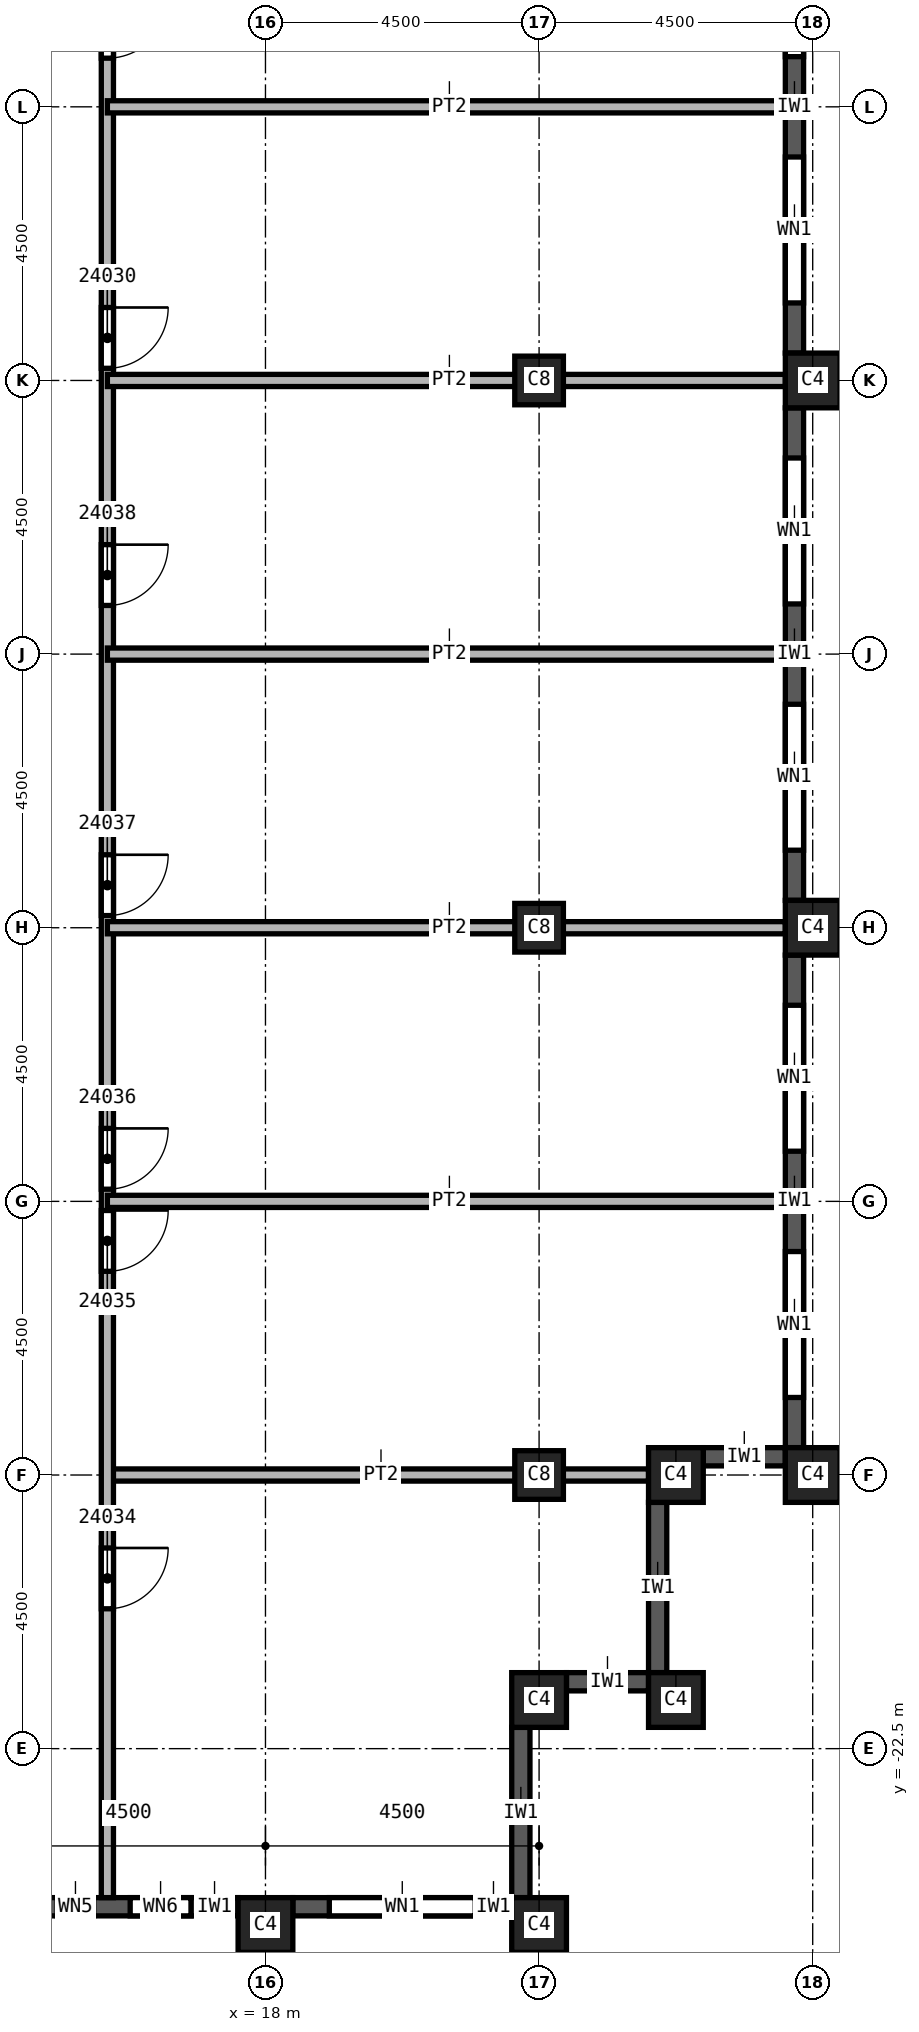
"""IFC4 building model, lengths in metres.
Left out: names, types, materials, properties, quantities, classifications, styles, units other than length and angle.
Written with IfcOpenShell. Run it as: python <this file> out.ifc"""

import sys

from ifc_helpers import new_model, si_unit, direction, frame, frame_2d, origin, origin_2d, place, context, subcontext, project, spatial, rectangle, extrude, element, fill, save


model = new_model("IFC4")
c1 = context("Model", 3, precision=1e-05, world=origin(), true_north=direction((0.0, 1.0)))
c2 = subcontext(c1, "Body", "Model", "MODEL_VIEW")
j1 = project(units=[si_unit("LENGTHUNIT", "METRE"), si_unit("PLANEANGLEUNIT", "RADIAN")], contexts=[c1])
p1 = place(None, origin())
s1 = spatial("IfcSite", under=j1, at=p1, CompositionType="ELEMENT")
p2 = place(p1, origin())
s2 = spatial("IfcBuilding", under=s1, at=p2, CompositionType="ELEMENT")
p3 = place(p2, frame((0.0, 0.0, 342.0)))
s3 = spatial("IfcBuildingStorey", under=s2, at=p3, CompositionType="ELEMENT", Elevation=342.0)
for number, where, z_axis, x_axis in (
    (1, (22.5, 0.0, 0.0), (0.0, 0.0, 1.0), (1.0, 0.0, 0.0)),
    (2, (22.5, -9.0, 0.0), (0.0, 0.0, 1.0), (1.0, 0.0, 0.0)),
    (3, (22.5, -18.0, 0.0), (0.0, 0.0, 1.0), (1.0, 0.0, 0.0)),
):
    element("IfcColumn", number, at=place(p3, frame(where, z_axis=z_axis, x_axis=x_axis)), inside=s3, PredefinedType="COLUMN", context=c2, shape_type="SweptSolid", body=[
        extrude(rectangle(XDim=0.8, YDim=0.8, at=origin_2d()), origin(), (0.0, 0.0, 1.0), 3.74),
    ])
for number, where, z_axis, x_axis in (
    (4, (27.0, 0.0, 0.0), (0.0, 0.0, 1.0), (0.0, 1.0, 0.0)),
    (5, (27.0, -9.0, 0.0), (0.0, 0.0, 1.0), (0.0, 1.0, 0.0)),
    (6, (27.0, -18.0, 0.0), (0.0, 0.0, 1.0), (0.0, 1.0, 0.0)),
    (7, (18.0, -25.4, 0.0), (0.0, 0.0, 1.0), (1.0, 0.0, 0.0)),
    (8, (22.5, -25.4, 0.0), (0.0, 0.0, 1.0), (1.0, 0.0, 0.0)),
    (9, (22.5, -21.7, 0.0), (0.0, 0.0, 1.0), (1.0, 0.0, 0.0)),
    (10, (24.75, -21.7, 0.0), (0.0, 0.0, 1.0), (1.0, 0.0, 0.0)),
    (11, (24.75, -18.0, 0.0), (0.0, 0.0, 1.0), (1.0, 0.0, 0.0)),
):
    element("IfcColumn", number, at=place(p3, frame(where, z_axis=z_axis, x_axis=x_axis)), inside=s3, PredefinedType="COLUMN", context=c2, shape_type="SweptSolid", body=[
        extrude(rectangle(XDim=0.9, YDim=0.9, at=origin_2d()), origin(), (0.0, 0.0, 1.0), 3.74),
    ])
p4 = place(p3, frame((13.95, -25.1, 0.0), z_axis=(0.0, 0.0, 1.0), x_axis=(1.0, 0.0, 0.0)))
e12 = element("IfcWall", 12, at=p4, inside=s3, PredefinedType="SOLIDWALL", context=c2, shape_type="SweptSolid", body=[
    extrude(rectangle(XDim=3.6, YDim=0.3, at=frame_2d((1.8, 0.0))), origin(), (0.0, 0.0, 1.0), 3.14),
])
p5 = place(p4, frame((0.625, 0.0, 0.8)))
e13 = element("IfcOpeningElement", 13, at=p5, cuts=e12, PredefinedType="OPENING", context=c2, shape_type="SweptSolid", body=[
    extrude(rectangle(XDim=0.6, YDim=1.95, at=frame_2d((0.3, 0.975))), frame((0.0, 0.15, 0.0), z_axis=(0.0, -1.0, 0.0), x_axis=(1.0, 0.0, 0.0)), (0.0, 0.0, 1.0), 0.3),
])
p6 = place(p4, frame((1.825, 0.0, 0.8)))
e14 = element("IfcOpeningElement", 14, at=p6, cuts=e12, PredefinedType="OPENING", context=c2, shape_type="SweptSolid", body=[
    extrude(rectangle(XDim=1.0, YDim=1.95, at=frame_2d((0.5, 0.975))), frame((0.0, 0.15, 0.0), z_axis=(0.0, -1.0, 0.0), x_axis=(1.0, 0.0, 0.0)), (0.0, 0.0, 1.0), 0.3),
])
p7 = place(p3, frame((18.45, -25.1, 0.0), z_axis=(0.0, 0.0, 1.0), x_axis=(1.0, 0.0, 0.0)))
e15 = element("IfcWall", 15, at=p7, inside=s3, PredefinedType="SOLIDWALL", context=c2, shape_type="SweptSolid", body=[
    extrude(rectangle(XDim=3.6, YDim=0.3, at=frame_2d((1.8, 0.0))), origin(), (0.0, 0.0, 1.0), 3.14),
])
p8 = place(p7, frame((0.6, 0.0, 0.8)))
e16 = element("IfcOpeningElement", 16, at=p8, cuts=e15, PredefinedType="OPENING", context=c2, shape_type="SweptSolid", body=[
    extrude(rectangle(XDim=2.4, YDim=1.95, at=frame_2d((1.2, 0.975))), frame((0.0, 0.15, 0.0), z_axis=(0.0, -1.0, 0.0), x_axis=(1.0, 0.0, 0.0)), (0.0, 0.0, 1.0), 0.3),
])
p9 = place(p3, frame((22.2, -24.95, 0.0), z_axis=(0.0, 0.0, 1.0), x_axis=(0.0, 1.0, 0.0)))
e17 = element("IfcWall", 17, at=p9, inside=s3, PredefinedType="SOLIDWALL", context=c2, shape_type="SweptSolid", body=[
    extrude(rectangle(XDim=2.8, YDim=0.3, at=frame_2d((1.4, 0.0))), origin(), (0.0, 0.0, 1.0), 3.14),
])
p10 = place(p3, frame((22.95, -21.4, 0.0), z_axis=(0.0, 0.0, 1.0), x_axis=(1.0, 0.0, 0.0)))
e18 = element("IfcWall", 18, at=p10, inside=s3, PredefinedType="SOLIDWALL", context=c2, shape_type="SweptSolid", body=[
    extrude(rectangle(XDim=1.35, YDim=0.3, at=frame_2d((0.675, 0.0))), origin(), (0.0, 0.0, 1.0), 3.14),
])
p11 = place(p3, frame((24.45, -21.25, 0.0), z_axis=(0.0, 0.0, 1.0), x_axis=(0.0, 1.0, 0.0)))
e19 = element("IfcWall", 19, at=p11, inside=s3, PredefinedType="SOLIDWALL", context=c2, shape_type="SweptSolid", body=[
    extrude(rectangle(XDim=2.8, YDim=0.3, at=frame_2d((1.4, 0.0))), origin(), (0.0, 0.0, 1.0), 3.14),
])
p12 = place(p3, frame((25.2, -17.7, 0.0), z_axis=(0.0, 0.0, 1.0), x_axis=(1.0, 0.0, 0.0)))
e20 = element("IfcWall", 20, at=p12, inside=s3, PredefinedType="SOLIDWALL", context=c2, shape_type="SweptSolid", body=[
    extrude(rectangle(XDim=1.35, YDim=0.3, at=frame_2d((0.675, 0.0))), origin(), (0.0, 0.0, 1.0), 3.14),
])
p13 = place(p3, frame((26.7, -17.55, 0.0), z_axis=(0.0, 0.0, 1.0), x_axis=(0.0, 1.0, 0.0)))
e21 = element("IfcWall", 21, at=p13, inside=s3, PredefinedType="SOLIDWALL", context=c2, shape_type="SweptSolid", body=[
    extrude(rectangle(XDim=8.1, YDim=0.3, at=frame_2d((4.05, 0.0))), origin(), (0.0, 0.0, 1.0), 3.14),
])
p14 = place(p13, frame((0.825, 0.0, 0.8)))
e22 = element("IfcOpeningElement", 22, at=p14, cuts=e21, PredefinedType="OPENING", context=c2, shape_type="SweptSolid", body=[
    extrude(rectangle(XDim=2.4, YDim=1.95, at=frame_2d((1.2, 0.975))), frame((0.0, 0.15, 0.0), z_axis=(0.0, -1.0, 0.0), x_axis=(1.0, 0.0, 0.0)), (0.0, 0.0, 1.0), 0.3),
])
p15 = place(p13, frame((4.875, 0.0, 0.8)))
e23 = element("IfcOpeningElement", 23, at=p15, cuts=e21, PredefinedType="OPENING", context=c2, shape_type="SweptSolid", body=[
    extrude(rectangle(XDim=2.4, YDim=1.95, at=frame_2d((1.2, 0.975))), frame((0.0, 0.15, 0.0), z_axis=(0.0, -1.0, 0.0), x_axis=(1.0, 0.0, 0.0)), (0.0, 0.0, 1.0), 0.3),
])
p16 = place(p3, frame((26.7, -8.55, 0.0), z_axis=(0.0, 0.0, 1.0), x_axis=(0.0, 1.0, 0.0)))
e24 = element("IfcWall", 24, at=p16, inside=s3, PredefinedType="SOLIDWALL", context=c2, shape_type="SweptSolid", body=[
    extrude(rectangle(XDim=8.1, YDim=0.3, at=frame_2d((4.05, 0.0))), origin(), (0.0, 0.0, 1.0), 3.14),
])
p17 = place(p16, frame((0.825, 0.0, 0.8)))
e25 = element("IfcOpeningElement", 25, at=p17, cuts=e24, PredefinedType="OPENING", context=c2, shape_type="SweptSolid", body=[
    extrude(rectangle(XDim=2.4, YDim=1.95, at=frame_2d((1.2, 0.975))), frame((0.0, 0.15, 0.0), z_axis=(0.0, -1.0, 0.0), x_axis=(1.0, 0.0, 0.0)), (0.0, 0.0, 1.0), 0.3),
])
p18 = place(p16, frame((4.875, 0.0, 0.8)))
e26 = element("IfcOpeningElement", 26, at=p18, cuts=e24, PredefinedType="OPENING", context=c2, shape_type="SweptSolid", body=[
    extrude(rectangle(XDim=2.4, YDim=1.95, at=frame_2d((1.2, 0.975))), frame((0.0, 0.15, 0.0), z_axis=(0.0, -1.0, 0.0), x_axis=(1.0, 0.0, 0.0)), (0.0, 0.0, 1.0), 0.3),
])
p19 = place(p3, frame((26.7, 0.45, 0.0), z_axis=(0.0, 0.0, 1.0), x_axis=(0.0, 1.0, 0.0)))
e27 = element("IfcWall", 27, at=p19, inside=s3, PredefinedType="SOLIDWALL", context=c2, shape_type="SweptSolid", body=[
    extrude(rectangle(XDim=8.1, YDim=0.3, at=frame_2d((4.05, 0.0))), origin(), (0.0, 0.0, 1.0), 3.14),
])
p20 = place(p19, frame((0.825, 0.0, 0.8)))
e28 = element("IfcOpeningElement", 28, at=p20, cuts=e27, PredefinedType="OPENING", context=c2, shape_type="SweptSolid", body=[
    extrude(rectangle(XDim=2.4, YDim=1.95, at=frame_2d((1.2, 0.975))), frame((0.0, 0.15, 0.0), z_axis=(0.0, -1.0, 0.0), x_axis=(1.0, 0.0, 0.0)), (0.0, 0.0, 1.0), 0.3),
])
p21 = place(p19, frame((4.875, 0.0, 0.8)))
e29 = element("IfcOpeningElement", 29, at=p21, cuts=e27, PredefinedType="OPENING", context=c2, shape_type="SweptSolid", body=[
    extrude(rectangle(XDim=2.4, YDim=1.95, at=frame_2d((1.2, 0.975))), frame((0.0, 0.15, 0.0), z_axis=(0.0, -1.0, 0.0), x_axis=(1.0, 0.0, 0.0)), (0.0, 0.0, 1.0), 0.3),
])
p22 = place(p3, frame((15.4, -18.0, 0.0), z_axis=(0.0, 0.0, 1.0), x_axis=(1.0, 0.0, 0.0)))
e30 = element("IfcWall", 30, at=p22, inside=s3, PredefinedType="PARTITIONING", context=c2, shape_type="SweptSolid", body=[
    extrude(rectangle(XDim=8.9, YDim=0.2, at=frame_2d((4.45, 0.0))), origin(), (0.0, 0.0, 1.0), 3.74),
])
p23 = place(p3, frame((15.4, 24.95, 0.0), z_axis=(0.0, 0.0, 1.0), x_axis=(0.0, -1.0, 0.0)))
e31 = element("IfcWall", 31, at=p23, inside=s3, PredefinedType="PARTITIONING", context=c2, shape_type="SweptSolid", body=[
    extrude(rectangle(XDim=49.9, YDim=0.2, at=frame_2d((24.95, 0.0))), origin(), (0.0, 0.0, 1.0), 3.74),
])
p24 = place(p23, frame((23.75, 0.0, 0.0)))
e32 = element("IfcOpeningElement", 32, at=p24, cuts=e31, PredefinedType="OPENING", context=c2, shape_type="SweptSolid", body=[
    extrude(rectangle(XDim=1.0, YDim=2.1, at=frame_2d((0.5, 1.05))), frame((0.0, 0.1, 0.0), z_axis=(0.0, -1.0, 0.0), x_axis=(1.0, 0.0, 0.0)), (0.0, 0.0, 1.0), 0.2),
])
p25 = place(p23, frame((18.65, 0.0, 0.0)))
e33 = element("IfcOpeningElement", 33, at=p25, cuts=e31, PredefinedType="OPENING", context=c2, shape_type="SweptSolid", body=[
    extrude(rectangle(XDim=1.0, YDim=2.1, at=frame_2d((0.5, 1.05))), frame((0.0, 0.1, 0.0), z_axis=(0.0, -1.0, 0.0), x_axis=(1.0, 0.0, 0.0)), (0.0, 0.0, 1.0), 0.2),
])
p26 = place(p23, frame((7.45, 0.0, 0.0)))
e34 = element("IfcOpeningElement", 34, at=p26, cuts=e31, PredefinedType="OPENING", context=c2, shape_type="SweptSolid", body=[
    extrude(rectangle(XDim=1.0, YDim=2.1, at=frame_2d((0.5, 1.05))), frame((0.0, 0.1, 0.0), z_axis=(0.0, -1.0, 0.0), x_axis=(1.0, 0.0, 0.0)), (0.0, 0.0, 1.0), 0.2),
])
p27 = place(p23, frame((44.15, 0.0, 0.0)))
e35 = element("IfcOpeningElement", 35, at=p27, cuts=e31, PredefinedType="OPENING", context=c2, shape_type="SweptSolid", body=[
    extrude(rectangle(XDim=1.0, YDim=2.1, at=frame_2d((0.5, 1.05))), frame((0.0, 0.1, 0.0), z_axis=(0.0, -1.0, 0.0), x_axis=(1.0, 0.0, 0.0)), (0.0, 0.0, 1.0), 0.2),
])
p28 = place(p23, frame((38.6, 0.0, 0.0)))
e36 = element("IfcOpeningElement", 36, at=p28, cuts=e31, PredefinedType="OPENING", context=c2, shape_type="SweptSolid", body=[
    extrude(rectangle(XDim=1.0, YDim=2.1, at=frame_2d((0.5, 1.05))), frame((0.0, 0.1, 0.0), z_axis=(0.0, -1.0, 0.0), x_axis=(1.0, 0.0, 0.0)), (0.0, 0.0, 1.0), 0.2),
])
p29 = place(p23, frame((37.25, 0.0, 0.0)))
e37 = element("IfcOpeningElement", 37, at=p29, cuts=e31, PredefinedType="OPENING", context=c2, shape_type="SweptSolid", body=[
    extrude(rectangle(XDim=1.0, YDim=2.1, at=frame_2d((0.5, 1.05))), frame((0.0, 0.1, 0.0), z_axis=(0.0, -1.0, 0.0), x_axis=(1.0, 0.0, 0.0)), (0.0, 0.0, 1.0), 0.2),
])
p30 = place(p23, frame((32.75, 0.0, 0.0)))
e38 = element("IfcOpeningElement", 38, at=p30, cuts=e31, PredefinedType="OPENING", context=c2, shape_type="SweptSolid", body=[
    extrude(rectangle(XDim=1.0, YDim=2.1, at=frame_2d((0.5, 1.05))), frame((0.0, 0.1, 0.0), z_axis=(0.0, -1.0, 0.0), x_axis=(1.0, 0.0, 0.0)), (0.0, 0.0, 1.0), 0.2),
])
p31 = place(p23, frame((27.65, 0.0, 0.0)))
e39 = element("IfcOpeningElement", 39, at=p31, cuts=e31, PredefinedType="OPENING", context=c2, shape_type="SweptSolid", body=[
    extrude(rectangle(XDim=1.0, YDim=2.1, at=frame_2d((0.5, 1.05))), frame((0.0, 0.1, 0.0), z_axis=(0.0, -1.0, 0.0), x_axis=(1.0, 0.0, 0.0)), (0.0, 0.0, 1.0), 0.2),
])
for number, where, z_axis, x_axis in (
    (40, (15.4, -13.5, 0.0), (0.0, 0.0, 1.0), (1.0, 0.0, 0.0)),
    (41, (15.4, -9.0, 0.0), (0.0, 0.0, 1.0), (1.0, 0.0, 0.0)),
    (42, (15.4, -4.5, 0.0), (0.0, 0.0, 1.0), (1.0, 0.0, 0.0)),
    (43, (15.4, 4.5, 0.0), (0.0, 0.0, 1.0), (1.0, 0.0, 0.0)),
    (44, (26.55, 0.0, 0.0), (0.0, 0.0, 1.0), (-1.0, 0.0, 0.0)),
):
    element("IfcWall", number, at=place(p3, frame(where, z_axis=z_axis, x_axis=x_axis)), inside=s3, PredefinedType="PARTITIONING", context=c2, shape_type="SweptSolid", body=[
        extrude(rectangle(XDim=11.15, YDim=0.2, at=frame_2d((5.575, 0.0))), origin(), (0.0, 0.0, 1.0), 3.74),
    ])
p32 = place(p8, origin())
e45 = element("IfcWindow", 45, at=p32, inside=s3, PartitioningType="SINGLE_PANEL", PredefinedType="WINDOW", context=c2, shape_type="SweptSolid", body=[
    extrude(rectangle(XDim=2.4, YDim=1.95, at=frame_2d((1.2, 0.975))), frame((0.0, 0.03, 0.0), z_axis=(0.0, -1.0, 0.0), x_axis=(1.0, 0.0, 0.0)), (0.0, 0.0, 1.0), 0.06),
])
fill(e16, e45)
p33 = place(p14, origin())
e46 = element("IfcWindow", 46, at=p33, inside=s3, PartitioningType="SINGLE_PANEL", PredefinedType="WINDOW", context=c2, shape_type="SweptSolid", body=[
    extrude(rectangle(XDim=2.4, YDim=1.95, at=frame_2d((1.2, 0.975))), frame((0.0, 0.03, 0.0), z_axis=(0.0, -1.0, 0.0), x_axis=(1.0, 0.0, 0.0)), (0.0, 0.0, 1.0), 0.06),
])
fill(e22, e46)
p34 = place(p15, origin())
e47 = element("IfcWindow", 47, at=p34, inside=s3, PartitioningType="SINGLE_PANEL", PredefinedType="WINDOW", context=c2, shape_type="SweptSolid", body=[
    extrude(rectangle(XDim=2.4, YDim=1.95, at=frame_2d((1.2, 0.975))), frame((0.0, 0.03, 0.0), z_axis=(0.0, -1.0, 0.0), x_axis=(1.0, 0.0, 0.0)), (0.0, 0.0, 1.0), 0.06),
])
fill(e23, e47)
p35 = place(p17, origin())
e48 = element("IfcWindow", 48, at=p35, inside=s3, PartitioningType="SINGLE_PANEL", PredefinedType="WINDOW", context=c2, shape_type="SweptSolid", body=[
    extrude(rectangle(XDim=2.4, YDim=1.95, at=frame_2d((1.2, 0.975))), frame((0.0, 0.03, 0.0), z_axis=(0.0, -1.0, 0.0), x_axis=(1.0, 0.0, 0.0)), (0.0, 0.0, 1.0), 0.06),
])
fill(e25, e48)
p36 = place(p18, origin())
e49 = element("IfcWindow", 49, at=p36, inside=s3, PartitioningType="SINGLE_PANEL", PredefinedType="WINDOW", context=c2, shape_type="SweptSolid", body=[
    extrude(rectangle(XDim=2.4, YDim=1.95, at=frame_2d((1.2, 0.975))), frame((0.0, 0.03, 0.0), z_axis=(0.0, -1.0, 0.0), x_axis=(1.0, 0.0, 0.0)), (0.0, 0.0, 1.0), 0.06),
])
fill(e26, e49)
p37 = place(p20, origin())
e50 = element("IfcWindow", 50, at=p37, inside=s3, PartitioningType="SINGLE_PANEL", PredefinedType="WINDOW", context=c2, shape_type="SweptSolid", body=[
    extrude(rectangle(XDim=2.4, YDim=1.95, at=frame_2d((1.2, 0.975))), frame((0.0, 0.03, 0.0), z_axis=(0.0, -1.0, 0.0), x_axis=(1.0, 0.0, 0.0)), (0.0, 0.0, 1.0), 0.06),
])
fill(e28, e50)
p38 = place(p21, origin())
e51 = element("IfcWindow", 51, at=p38, inside=s3, PartitioningType="SINGLE_PANEL", PredefinedType="WINDOW", context=c2, shape_type="SweptSolid", body=[
    extrude(rectangle(XDim=2.4, YDim=1.95, at=frame_2d((1.2, 0.975))), frame((0.0, 0.03, 0.0), z_axis=(0.0, -1.0, 0.0), x_axis=(1.0, 0.0, 0.0)), (0.0, 0.0, 1.0), 0.06),
])
fill(e29, e51)
p39 = place(p24, origin())
e52 = element("IfcDoor", 52, at=p39, inside=s3, OperationType="SINGLE_SWING_LEFT", PredefinedType="DOOR", context=c2, shape_type="SweptSolid", body=[
    extrude(rectangle(XDim=1.0, YDim=2.1, at=frame_2d((0.5, 1.05))), frame((0.0, 0.025, 0.0), z_axis=(0.0, -1.0, 0.0), x_axis=(1.0, 0.0, 0.0)), (0.0, 0.0, 1.0), 0.05),
])
fill(e32, e52)
p40 = place(p25, origin())
e53 = element("IfcDoor", 53, at=p40, inside=s3, OperationType="SINGLE_SWING_RIGHT", PredefinedType="DOOR", context=c2, shape_type="SweptSolid", body=[
    extrude(rectangle(XDim=1.0, YDim=2.1, at=frame_2d((0.5, 1.05))), frame((0.0, 0.025, 0.0), z_axis=(0.0, -1.0, 0.0), x_axis=(1.0, 0.0, 0.0)), (0.0, 0.0, 1.0), 0.05),
])
fill(e33, e53)
p41 = place(p27, origin())
e54 = element("IfcDoor", 54, at=p41, inside=s3, OperationType="SINGLE_SWING_LEFT", PredefinedType="DOOR", context=c2, shape_type="SweptSolid", body=[
    extrude(rectangle(XDim=1.0, YDim=2.1, at=frame_2d((0.5, 1.05))), frame((0.0, 0.025, 0.0), z_axis=(0.0, -1.0, 0.0), x_axis=(1.0, 0.0, 0.0)), (0.0, 0.0, 1.0), 0.05),
])
fill(e35, e54)
p42 = place(p28, origin())
e55 = element("IfcDoor", 55, at=p42, inside=s3, OperationType="SINGLE_SWING_RIGHT", PredefinedType="DOOR", context=c2, shape_type="SweptSolid", body=[
    extrude(rectangle(XDim=1.0, YDim=2.1, at=frame_2d((0.5, 1.05))), frame((0.0, 0.025, 0.0), z_axis=(0.0, -1.0, 0.0), x_axis=(1.0, 0.0, 0.0)), (0.0, 0.0, 1.0), 0.05),
])
fill(e36, e55)
p43 = place(p29, origin())
e56 = element("IfcDoor", 56, at=p43, inside=s3, OperationType="SINGLE_SWING_LEFT", PredefinedType="DOOR", context=c2, shape_type="SweptSolid", body=[
    extrude(rectangle(XDim=1.0, YDim=2.1, at=frame_2d((0.5, 1.05))), frame((0.0, 0.025, 0.0), z_axis=(0.0, -1.0, 0.0), x_axis=(1.0, 0.0, 0.0)), (0.0, 0.0, 1.0), 0.05),
])
fill(e37, e56)
p44 = place(p30, origin())
e57 = element("IfcDoor", 57, at=p44, inside=s3, OperationType="SINGLE_SWING_RIGHT", PredefinedType="DOOR", context=c2, shape_type="SweptSolid", body=[
    extrude(rectangle(XDim=1.0, YDim=2.1, at=frame_2d((0.5, 1.05))), frame((0.0, 0.025, 0.0), z_axis=(0.0, -1.0, 0.0), x_axis=(1.0, 0.0, 0.0)), (0.0, 0.0, 1.0), 0.05),
])
fill(e38, e57)
p45 = place(p31, origin())
e58 = element("IfcDoor", 58, at=p45, inside=s3, OperationType="SINGLE_SWING_LEFT", PredefinedType="DOOR", context=c2, shape_type="SweptSolid", body=[
    extrude(rectangle(XDim=1.0, YDim=2.1, at=frame_2d((0.5, 1.05))), frame((0.0, 0.025, 0.0), z_axis=(0.0, -1.0, 0.0), x_axis=(1.0, 0.0, 0.0)), (0.0, 0.0, 1.0), 0.05),
])
fill(e39, e58)
p46 = place(p5, origin())
e59 = element("IfcWindow", 59, at=p46, inside=s3, PartitioningType="SINGLE_PANEL", PredefinedType="WINDOW", context=c2, shape_type="SweptSolid", body=[
    extrude(rectangle(XDim=0.6, YDim=1.95, at=frame_2d((0.3, 0.975))), frame((0.0, 0.03, 0.0), z_axis=(0.0, -1.0, 0.0), x_axis=(1.0, 0.0, 0.0)), (0.0, 0.0, 1.0), 0.06),
])
fill(e13, e59)
p47 = place(p6, origin())
e60 = element("IfcWindow", 60, at=p47, inside=s3, PartitioningType="SINGLE_PANEL", PredefinedType="WINDOW", context=c2, shape_type="SweptSolid", body=[
    extrude(rectangle(XDim=1.0, YDim=1.95, at=frame_2d((0.5, 0.975))), frame((0.0, 0.03, 0.0), z_axis=(0.0, -1.0, 0.0), x_axis=(1.0, 0.0, 0.0)), (0.0, 0.0, 1.0), 0.06),
])
fill(e14, e60)
save(model, sys.argv[1])
